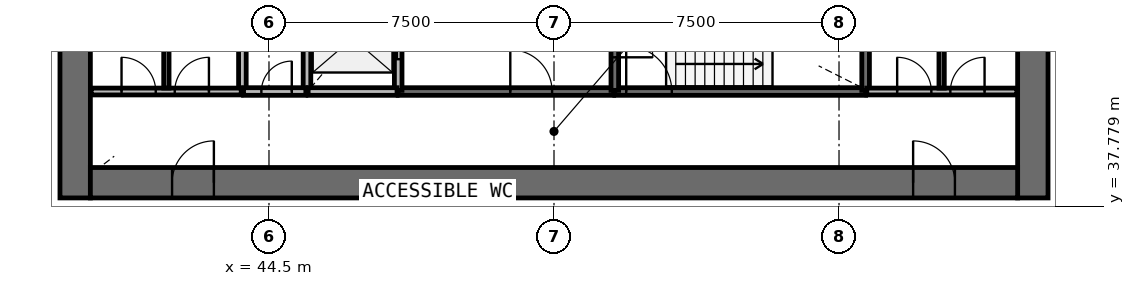
"""IFC4 building model, lengths in metres.
Left out: names, types, materials, properties, quantities, classifications, styles, units other than length and angle.
Written with IfcOpenShell. Run it as: python <this file> out.ifc"""

import sys

from ifc_helpers import new_model, si_unit, direction, frame, frame_2d, origin, place, context, subcontext, project, spatial, rectangle, extrude, source, transform, mapped, element, fill, save


model = new_model("IFC4")
c1 = context("Model", 3, precision=1e-05, world=origin(), true_north=direction((0.0, 1.0)))
c2 = subcontext(c1, "Body", "Model", "MODEL_VIEW")
j1 = project(units=[si_unit("LENGTHUNIT", "METRE"), si_unit("PLANEANGLEUNIT", "RADIAN")], contexts=[c1])
p1 = place(None, origin())
s1 = spatial("IfcSite", under=j1, at=p1, CompositionType="ELEMENT")
p2 = place(p1, origin())
s2 = spatial("IfcBuilding", under=s1, at=p2, CompositionType="ELEMENT")
p3 = place(p2, frame((0.0, 0.0, 92.1)))
s3 = spatial("IfcBuildingStorey", under=s2, at=p3, CompositionType="ELEMENT", Elevation=92.1)
p4 = place(p3, frame((64.6, 38.0, 0.0), z_axis=(0.0, 0.0, 1.0), x_axis=(0.0, 1.0, 0.0)))
e1 = element("IfcWall", 1, at=p4, inside=s3, PredefinedType="SHEAR", context=c2, shape_type="SweptSolid", body=[
    extrude(rectangle(XDim=20.0, YDim=0.8, at=frame_2d((10.0, 0.0))), origin(), (0.0, 0.0, 1.0), 4.1),
])
p5 = place(p4, frame((9.1, 0.0, 0.0)))
e2 = element("IfcOpeningElement", 2, at=p5, cuts=e1, PredefinedType="OPENING", context=c2, shape_type="SweptSolid", body=[
    extrude(rectangle(XDim=1.8, YDim=2.1, at=frame_2d((0.9, 1.05))), frame((0.0, 0.41, 0.0), z_axis=(0.0, -1.0, 0.0), x_axis=(1.0, 0.0, 0.0)), (0.0, 0.0, 1.0), 0.82),
])
p6 = place(p3, frame((39.4, 58.0, 0.0), z_axis=(0.0, 0.0, 1.0), x_axis=(0.0, -1.0, 0.0)))
e3 = element("IfcWall", 3, at=p6, inside=s3, PredefinedType="SHEAR", context=c2, shape_type="SweptSolid", body=[
    extrude(rectangle(XDim=20.0, YDim=0.8, at=frame_2d((10.0, 0.0))), origin(), (0.0, 0.0, 1.0), 4.1),
])
p7 = place(p6, frame((9.1, 0.0, 0.0)))
e4 = element("IfcOpeningElement", 4, at=p7, cuts=e3, PredefinedType="OPENING", context=c2, shape_type="SweptSolid", body=[
    extrude(rectangle(XDim=1.8, YDim=2.1, at=frame_2d((0.9, 1.05))), frame((0.0, 0.41, 0.0), z_axis=(0.0, -1.0, 0.0), x_axis=(1.0, 0.0, 0.0)), (0.0, 0.0, 1.0), 0.82),
])
p8 = place(p3, frame((39.8, 38.4, 0.0), z_axis=(0.0, 0.0, 1.0), x_axis=(1.0, 0.0, 0.0)))
e5 = element("IfcWall", 5, at=p8, inside=s3, PredefinedType="SHEAR", context=c2, shape_type="SweptSolid", body=[
    extrude(rectangle(XDim=24.4, YDim=0.8, at=frame_2d((12.2, 0.0))), origin(), (0.0, 0.0, 1.0), 4.1),
])
p9 = place(p8, frame((21.65, 0.0, 0.0)))
e6 = element("IfcOpeningElement", 6, at=p9, cuts=e5, PredefinedType="OPENING", context=c2, shape_type="SweptSolid", body=[
    extrude(rectangle(XDim=1.1, YDim=2.1, at=frame_2d((0.55, 1.05))), frame((0.0, 0.41, 0.0), z_axis=(0.0, -1.0, 0.0), x_axis=(1.0, 0.0, 0.0)), (0.0, 0.0, 1.0), 0.82),
])
p10 = place(p8, frame((2.15, 0.0, 0.0)))
e7 = element("IfcOpeningElement", 7, at=p10, cuts=e5, PredefinedType="OPENING", context=c2, shape_type="SweptSolid", body=[
    extrude(rectangle(XDim=1.1, YDim=2.1, at=frame_2d((0.55, 1.05))), frame((0.0, 0.41, 0.0), z_axis=(0.0, -1.0, 0.0), x_axis=(1.0, 0.0, 0.0)), (0.0, 0.0, 1.0), 0.82),
])
p11 = place(p3, frame((53.6, 40.8, 0.0), z_axis=(0.0, 0.0, 1.0), x_axis=(1.0, 0.0, 0.0)))
e8 = element("IfcWall", 8, at=p11, inside=s3, PredefinedType="SOLIDWALL", context=c2, shape_type="SweptSolid", body=[
    extrude(rectangle(XDim=6.6, YDim=0.2, at=frame_2d((3.3, 0.0))), origin(), (0.0, 0.0, 1.0), 3.7),
])
p12 = place(p11, frame((0.3, 0.0, 0.0)))
e9 = element("IfcOpeningElement", 9, at=p12, cuts=e8, PredefinedType="OPENING", context=c2, shape_type="SweptSolid", body=[
    extrude(rectangle(XDim=1.2, YDim=2.1, at=frame_2d((0.6, 1.05))), frame((0.0, 0.11, 0.0), z_axis=(0.0, -1.0, 0.0), x_axis=(1.0, 0.0, 0.0)), (0.0, 0.0, 1.0), 0.22),
])
p13 = place(p3, frame((47.9, 40.8, 0.0), z_axis=(0.0, 0.0, 1.0), x_axis=(1.0, 0.0, 0.0)))
e10 = element("IfcWall", 10, at=p13, inside=s3, PredefinedType="SOLIDWALL", context=c2, shape_type="SweptSolid", body=[
    extrude(rectangle(XDim=5.67, YDim=0.2, at=frame_2d((2.835, 0.0))), origin(), (0.0, 0.0, 1.0), 3.7),
])
p14 = place(p13, frame((2.95, 0.0, 0.0)))
e11 = element("IfcOpeningElement", 11, at=p14, cuts=e10, PredefinedType="OPENING", context=c2, shape_type="SweptSolid", body=[
    extrude(rectangle(XDim=1.1, YDim=2.1, at=frame_2d((0.55, 1.05))), frame((0.0, 0.11, 0.0), z_axis=(0.0, -1.0, 0.0), x_axis=(1.0, 0.0, 0.0)), (0.0, 0.0, 1.0), 0.22),
])
for number, where, z_axis, x_axis in (
    (12, (43.8, 43.6, 0.0), (0.0, 0.0, 1.0), (0.0, -1.0, 0.0)),
    (13, (45.5, 43.6, 0.0), (0.0, 0.0, 1.0), (0.0, -1.0, 0.0)),
):
    element("IfcWall", number, at=place(p3, frame(where, z_axis=z_axis, x_axis=x_axis)), inside=s3, PredefinedType="SOLIDWALL", context=c2, shape_type="SweptSolid", body=[
        extrude(rectangle(XDim=2.8, YDim=0.2, at=frame_2d((1.4, 0.0))), origin(), (0.0, 0.0, 1.0), 3.7),
    ])
p15 = place(p3, frame((47.9, 40.83, 0.0), z_axis=(0.0, 0.0, 1.0), x_axis=(0.0, 1.0, 0.0)))
e14 = element("IfcWall", 14, at=p15, inside=s3, PredefinedType="SOLIDWALL", context=c2, shape_type="SweptSolid", body=[
    extrude(rectangle(XDim=2.77, YDim=0.2, at=frame_2d((1.385, 0.0))), origin(), (0.0, 0.0, 1.0), 3.7),
])
p16 = place(p15, frame((0.82, 0.0, 0.0)))
e15 = element("IfcOpeningElement", 15, at=p16, cuts=e14, PredefinedType="OPENING", context=c2, shape_type="SweptSolid", body=[
    extrude(rectangle(XDim=1.1, YDim=2.1, at=frame_2d((0.55, 1.05))), frame((0.0, 0.11, 0.0), z_axis=(0.0, -1.0, 0.0), x_axis=(1.0, 0.0, 0.0)), (0.0, 0.0, 1.0), 0.22),
])
p17 = place(p3, frame((60.2, 40.83, 0.0), z_axis=(0.0, 0.0, 1.0), x_axis=(0.0, 1.0, 0.0)))
e16 = element("IfcWall", 16, at=p17, inside=s3, PredefinedType="SOLIDWALL", context=c2, shape_type="SweptSolid", body=[
    extrude(rectangle(XDim=2.77, YDim=0.2, at=frame_2d((1.385, 0.0))), origin(), (0.0, 0.0, 1.0), 3.7),
])
p18 = place(p3, frame((53.6, 43.6, 0.0), z_axis=(0.0, 0.0, 1.0), x_axis=(0.0, -1.0, 0.0)))
e17 = element("IfcWall", 17, at=p18, inside=s3, PredefinedType="SOLIDWALL", context=c2, shape_type="SweptSolid", body=[
    extrude(rectangle(XDim=2.77, YDim=0.2, at=frame_2d((1.385, 0.0))), origin(), (0.0, 0.0, 1.0), 3.7),
])
p19 = place(p18, frame((0.9, 0.0, 0.0)))
e18 = element("IfcOpeningElement", 18, at=p19, cuts=e17, PredefinedType="OPENING", context=c2, shape_type="SweptSolid", body=[
    extrude(rectangle(XDim=1.0, YDim=2.1, at=frame_2d((0.5, 1.05))), frame((0.0, 0.11, 0.0), z_axis=(0.0, -1.0, 0.0), x_axis=(1.0, 0.0, 0.0)), (0.0, 0.0, 1.0), 0.22),
])
p20 = place(p3, frame((45.53, 40.8, 0.0), z_axis=(0.0, 0.0, 1.0), x_axis=(1.0, 0.0, 0.0)))
e19 = element("IfcWall", 19, at=p20, inside=s3, PredefinedType="SOLIDWALL", context=c2, shape_type="SweptSolid", body=[
    extrude(rectangle(XDim=2.34, YDim=0.2, at=frame_2d((1.17, 0.0))), origin(), (0.0, 0.0, 1.0), 3.7),
])
p21 = place(p3, frame((43.83, 40.8, 0.0), z_axis=(0.0, 0.0, 1.0), x_axis=(1.0, 0.0, 0.0)))
e20 = element("IfcWall", 20, at=p21, inside=s3, PredefinedType="SOLIDWALL", context=c2, shape_type="SweptSolid", body=[
    extrude(rectangle(XDim=1.64, YDim=0.2, at=frame_2d((0.82, 0.0))), origin(), (0.0, 0.0, 1.0), 3.7),
])
p22 = place(p21, frame((0.47, 0.0, 0.0)))
e21 = element("IfcOpeningElement", 21, at=p22, cuts=e20, PredefinedType="OPENING", context=c2, shape_type="SweptSolid", body=[
    extrude(rectangle(XDim=0.8, YDim=2.1, at=frame_2d((0.4, 1.05))), frame((0.0, 0.11, 0.0), z_axis=(0.0, -1.0, 0.0), x_axis=(1.0, 0.0, 0.0)), (0.0, 0.0, 1.0), 0.22),
])
p23 = place(p3, frame((60.23, 40.8, 0.0), z_axis=(0.0, 0.0, 1.0), x_axis=(1.0, 0.0, 0.0)))
e22 = element("IfcWall", 22, at=p23, inside=s3, PredefinedType="PARTITIONING", context=c2, shape_type="SweptSolid", body=[
    extrude(rectangle(XDim=3.95, YDim=0.18, at=frame_2d((1.975, 0.0))), origin(), (0.0, 0.0, 1.0), 3.7),
])
p24 = place(p23, frame((0.8, 0.0, 0.0)))
e23 = element("IfcOpeningElement", 23, at=p24, cuts=e22, PredefinedType="OPENING", context=c2, shape_type="SweptSolid", body=[
    extrude(rectangle(XDim=0.9, YDim=2.1, at=frame_2d((0.45, 1.05))), frame((0.0, 0.1, 0.0), z_axis=(0.0, -1.0, 0.0), x_axis=(1.0, 0.0, 0.0)), (0.0, 0.0, 1.0), 0.2),
])
p25 = place(p23, frame((2.2, 0.0, 0.0)))
e24 = element("IfcOpeningElement", 24, at=p25, cuts=e22, PredefinedType="OPENING", context=c2, shape_type="SweptSolid", body=[
    extrude(rectangle(XDim=0.9, YDim=2.1, at=frame_2d((0.45, 1.05))), frame((0.0, 0.1, 0.0), z_axis=(0.0, -1.0, 0.0), x_axis=(1.0, 0.0, 0.0)), (0.0, 0.0, 1.0), 0.2),
])
p26 = place(p3, frame((39.82, 40.8, 0.0), z_axis=(0.0, 0.0, 1.0), x_axis=(1.0, 0.0, 0.0)))
e25 = element("IfcWall", 25, at=p26, inside=s3, PredefinedType="PARTITIONING", context=c2, shape_type="SweptSolid", body=[
    extrude(rectangle(XDim=3.95, YDim=0.18, at=frame_2d((1.975, 0.0))), origin(), (0.0, 0.0, 1.0), 3.7),
])
p27 = place(p26, frame((0.8, 0.0, 0.0)))
e26 = element("IfcOpeningElement", 26, at=p27, cuts=e25, PredefinedType="OPENING", context=c2, shape_type="SweptSolid", body=[
    extrude(rectangle(XDim=0.9, YDim=2.1, at=frame_2d((0.45, 1.05))), frame((0.0, 0.1, 0.0), z_axis=(0.0, -1.0, 0.0), x_axis=(1.0, 0.0, 0.0)), (0.0, 0.0, 1.0), 0.2),
])
p28 = place(p26, frame((2.2, 0.0, 0.0)))
e27 = element("IfcOpeningElement", 27, at=p28, cuts=e25, PredefinedType="OPENING", context=c2, shape_type="SweptSolid", body=[
    extrude(rectangle(XDim=0.9, YDim=2.1, at=frame_2d((0.45, 1.05))), frame((0.0, 0.1, 0.0), z_axis=(0.0, -1.0, 0.0), x_axis=(1.0, 0.0, 0.0)), (0.0, 0.0, 1.0), 0.2),
])
for number, where, z_axis, x_axis in (
    (28, (41.8, 40.89, 0.0), (0.0, 0.0, 1.0), (0.0, 1.0, 0.0)),
    (29, (62.2, 40.89, 0.0), (0.0, 0.0, 1.0), (0.0, 1.0, 0.0)),
):
    element("IfcWall", number, at=place(p3, frame(where, z_axis=z_axis, x_axis=x_axis)), inside=s3, PredefinedType="PARTITIONING", context=c2, shape_type="SweptSolid", body=[
        extrude(rectangle(XDim=2.71, YDim=0.14, at=frame_2d((1.355, 0.0))), origin(), (0.0, 0.0, 1.0), 2.9),
    ])
m1 = source(origin(), c2, "Body", "SweptSolid", [
    extrude(rectangle(XDim=1.1, YDim=2.1, at=frame_2d((0.55, 1.05))), frame((0.0, 0.025, 0.0), z_axis=(0.0, -1.0, 0.0), x_axis=(1.0, 0.0, 0.0)), (0.0, 0.0, 1.0), 0.05),
])
p29 = place(p16, origin())
e30 = element("IfcDoor", 30, at=p29, inside=s3, OperationType="DOUBLE_DOOR_SLIDING", PredefinedType="USERDEFINED", context=c2, shape_type="MappedRepresentation", body=[
    mapped(m1, transform((0.0, 0.0, 0.0), scale=1.0)),
])
fill(e15, e30)
m2 = source(origin(), c2, "Body", "SweptSolid", [
    extrude(rectangle(XDim=1.2, YDim=2.1, at=frame_2d((0.6, 1.05))), frame((0.0, 0.025, 0.0), z_axis=(0.0, -1.0, 0.0), x_axis=(1.0, 0.0, 0.0)), (0.0, 0.0, 1.0), 0.05),
])
p30 = place(p12, origin())
e31 = element("IfcDoor", 31, at=p30, inside=s3, OperationType="SINGLE_SWING_LEFT", PredefinedType="DOOR", context=c2, shape_type="MappedRepresentation", body=[
    mapped(m2, transform((0.0, 0.0, 0.0), scale=1.0)),
])
fill(e9, e31)
m3 = source(origin(), c2, "Body", "SweptSolid", [
    extrude(rectangle(XDim=1.0, YDim=2.1, at=frame_2d((0.5, 1.05))), frame((0.0, 0.025, 0.0), z_axis=(0.0, -1.0, 0.0), x_axis=(1.0, 0.0, 0.0)), (0.0, 0.0, 1.0), 0.05),
])
p31 = place(p19, origin())
e32 = element("IfcDoor", 32, at=p31, inside=s3, OperationType="SINGLE_SWING_RIGHT", PredefinedType="DOOR", context=c2, shape_type="MappedRepresentation", body=[
    mapped(m3, transform((0.0, 0.0, 0.0), scale=1.0)),
])
fill(e18, e32)
m4 = source(origin(), c2, "Body", "SweptSolid", [
    extrude(rectangle(XDim=1.1, YDim=2.1, at=frame_2d((0.55, 1.05))), frame((0.0, 0.025, 0.0), z_axis=(0.0, -1.0, 0.0), x_axis=(1.0, 0.0, 0.0)), (0.0, 0.0, 1.0), 0.05),
])
p32 = place(p14, origin())
e33 = element("IfcDoor", 33, at=p32, inside=s3, OperationType="SINGLE_SWING_LEFT", PredefinedType="DOOR", context=c2, shape_type="MappedRepresentation", body=[
    mapped(m4, transform((0.0, 0.0, 0.0), scale=1.0)),
])
fill(e11, e33)
m5 = source(origin(), c2, "Body", "SweptSolid", [
    extrude(rectangle(XDim=0.8, YDim=2.1, at=frame_2d((0.4, 1.05))), frame((0.0, 0.025, 0.0), z_axis=(0.0, -1.0, 0.0), x_axis=(1.0, 0.0, 0.0)), (0.0, 0.0, 1.0), 0.05),
])
p33 = place(p22, origin())
e34 = element("IfcDoor", 34, at=p33, inside=s3, OperationType="SINGLE_SWING_RIGHT", PredefinedType="DOOR", context=c2, shape_type="MappedRepresentation", body=[
    mapped(m5, transform((0.0, 0.0, 0.0), scale=1.0)),
])
fill(e21, e34)
m6 = source(origin(), c2, "Body", "SweptSolid", [
    extrude(rectangle(XDim=1.1, YDim=2.1, at=frame_2d((0.55, 1.05))), frame((0.0, 0.025, 0.0), z_axis=(0.0, -1.0, 0.0), x_axis=(1.0, 0.0, 0.0)), (0.0, 0.0, 1.0), 0.05),
])
p34 = place(p9, origin())
e35 = element("IfcDoor", 35, at=p34, inside=s3, OperationType="SINGLE_SWING_LEFT", PredefinedType="DOOR", context=c2, shape_type="MappedRepresentation", body=[
    mapped(m6, transform((0.0, 0.0, 0.0), scale=1.0)),
])
fill(e6, e35)
p35 = place(p10, origin())
e36 = element("IfcDoor", 36, at=p35, inside=s3, OperationType="SINGLE_SWING_RIGHT", PredefinedType="DOOR", context=c2, shape_type="MappedRepresentation", body=[
    mapped(m6, transform((0.0, 0.0, 0.0), scale=1.0)),
])
fill(e7, e36)
m7 = source(origin(), c2, "Body", "SweptSolid", [
    extrude(rectangle(XDim=0.9, YDim=2.1, at=frame_2d((0.45, 1.05))), frame((0.0, 0.025, 0.0), z_axis=(0.0, -1.0, 0.0), x_axis=(1.0, 0.0, 0.0)), (0.0, 0.0, 1.0), 0.05),
])
p36 = place(p27, origin())
e37 = element("IfcDoor", 37, at=p36, inside=s3, OperationType="SINGLE_SWING_LEFT", PredefinedType="DOOR", context=c2, shape_type="MappedRepresentation", body=[
    mapped(m7, transform((0.0, 0.0, 0.0), scale=1.0)),
])
fill(e26, e37)
p37 = place(p28, origin())
e38 = element("IfcDoor", 38, at=p37, inside=s3, OperationType="SINGLE_SWING_RIGHT", PredefinedType="DOOR", context=c2, shape_type="MappedRepresentation", body=[
    mapped(m7, transform((0.0, 0.0, 0.0), scale=1.0)),
])
fill(e27, e38)
p38 = place(p24, origin())
e39 = element("IfcDoor", 39, at=p38, inside=s3, OperationType="SINGLE_SWING_LEFT", PredefinedType="DOOR", context=c2, shape_type="MappedRepresentation", body=[
    mapped(m7, transform((0.0, 0.0, 0.0), scale=1.0)),
])
fill(e23, e39)
p39 = place(p25, origin())
e40 = element("IfcDoor", 40, at=p39, inside=s3, OperationType="SINGLE_SWING_RIGHT", PredefinedType="DOOR", context=c2, shape_type="MappedRepresentation", body=[
    mapped(m7, transform((0.0, 0.0, 0.0), scale=1.0)),
])
fill(e24, e40)
save(model, sys.argv[1])
